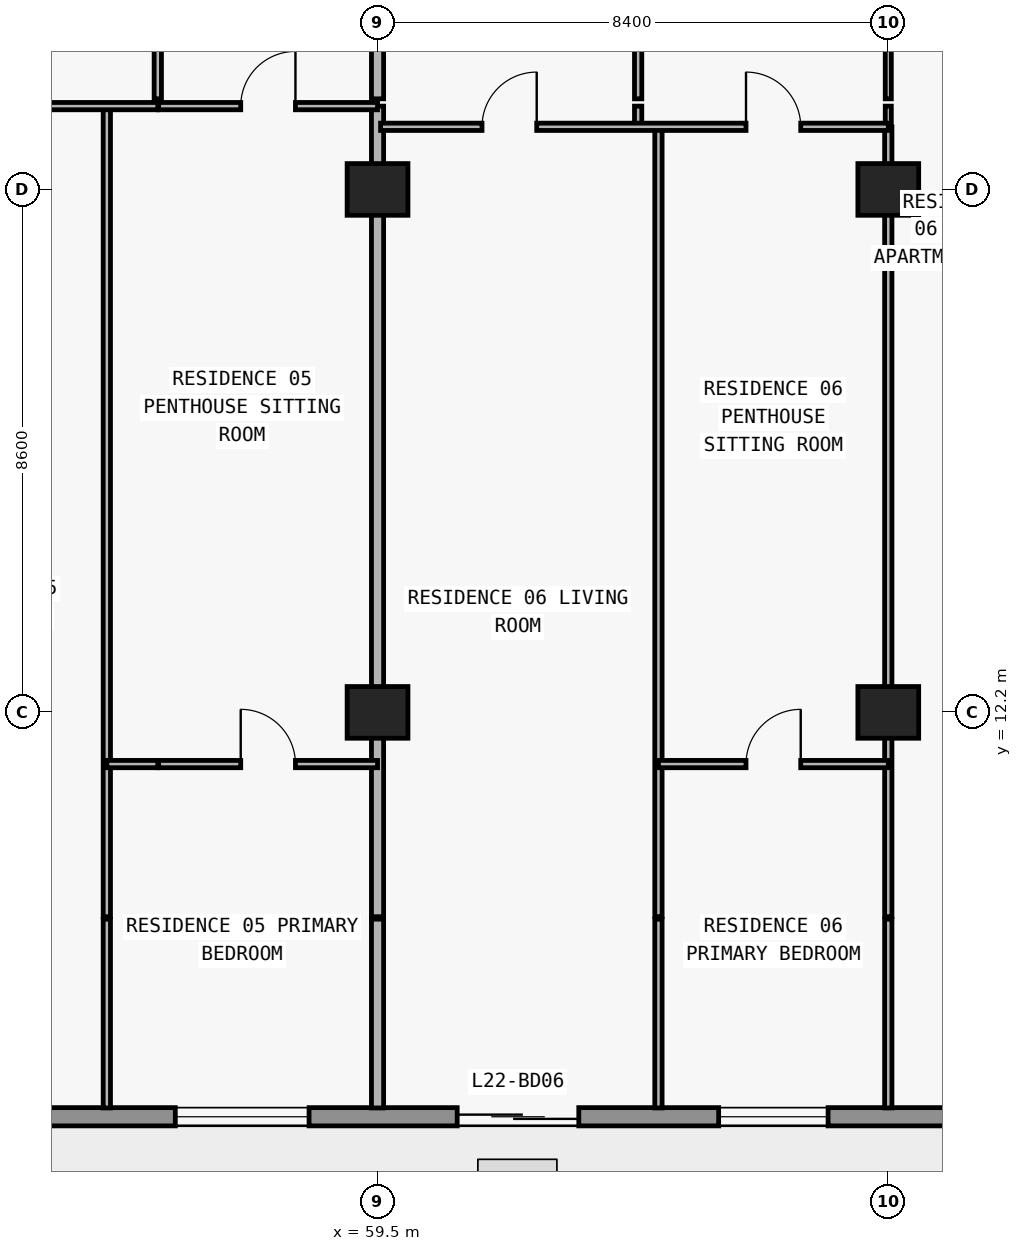
"""IFC4 building model, lengths in metres.
Left out: names, types, materials, properties, quantities, classifications, styles, units other than length and angle.
Written with IfcOpenShell. Run it as: python <this file> out.ifc"""

import sys

from ifc_helpers import new_model, si_unit, direction, frame, frame_2d, origin, origin_2d, place, context, subcontext, project, spatial, rectangle, extrude, element, fill, save


model = new_model("IFC4")
c1 = context("Model", 3, precision=1e-05, world=origin(), true_north=direction((0.0, 1.0)))
c2 = subcontext(c1, "Body", "Model", "MODEL_VIEW")
j1 = project(units=[si_unit("LENGTHUNIT", "METRE"), si_unit("PLANEANGLEUNIT", "RADIAN")], contexts=[c1])
p1 = place(None, origin())
s1 = spatial("IfcSite", under=j1, at=p1, CompositionType="ELEMENT")
p2 = place(p1, origin())
s2 = spatial("IfcBuilding", under=s1, at=p2, CompositionType="ELEMENT")
p3 = place(p2, frame((0.0, 0.0, 84.6)))
s3 = spatial("IfcBuildingStorey", under=s2, at=p3, CompositionType="ELEMENT", Elevation=84.6)
for number, where, z_axis, x_axis in (
    (1, (59.5, 12.2, 0.0), (0.0, 0.0, 1.0), (1.0, 0.0, 0.0)),
    (2, (67.9, 12.2, 0.0), (0.0, 0.0, 1.0), (1.0, 0.0, 0.0)),
    (3, (59.5, 20.8, 0.0), (0.0, 0.0, 1.0), (1.0, 0.0, 0.0)),
    (4, (67.9, 20.8, 0.0), (0.0, 0.0, 1.0), (1.0, 0.0, 0.0)),
):
    element("IfcColumn", number, at=place(p3, frame(where, z_axis=z_axis, x_axis=x_axis)), inside=s3, PredefinedType="COLUMN", context=c2, shape_type="SweptSolid", body=[
        extrude(rectangle(XDim=1.0, YDim=0.85, at=origin_2d()), origin(), (0.0, 0.0, 1.0), 3.05),
    ])
p4 = place(p3, frame((70.1, 5.55, 0.0), z_axis=(0.0, 0.0, 1.0), x_axis=(-1.0, 0.0, 0.0)))
e5 = element("IfcWall", 5, at=p4, inside=s3, PredefinedType="STANDARD", context=c2, shape_type="SweptSolid", body=[
    extrude(rectangle(XDim=62.4, YDim=0.3, at=frame_2d((31.2, 0.0))), origin(), (0.0, 0.0, 1.0), 3.05),
])
p5 = place(p4, frame((57.226, 0.0, 0.0)))
e6 = element("IfcOpeningElement", 6, at=p5, cuts=e5, PredefinedType="OPENING", context=c2, shape_type="SweptSolid", body=[
    extrude(rectangle(XDim=2.0, YDim=2.3, at=frame_2d((1.0, 1.15))), frame((0.0, 0.16, 0.0), z_axis=(0.0, -1.0, 0.0), x_axis=(1.0, 0.0, 0.0)), (0.0, 0.0, 1.0), 0.32),
])
p6 = place(p4, frame((52.926, 0.0, 0.85)))
e7 = element("IfcOpeningElement", 7, at=p6, cuts=e5, PredefinedType="OPENING", context=c2, shape_type="SweptSolid", body=[
    extrude(rectangle(XDim=2.2, YDim=1.55, at=frame_2d((1.1, 0.775))), frame((0.0, 0.16, 0.0), z_axis=(0.0, -1.0, 0.0), x_axis=(1.0, 0.0, 0.0)), (0.0, 0.0, 1.0), 0.32),
])
p7 = place(p4, frame((48.49, 0.0, 0.0)))
e8 = element("IfcOpeningElement", 8, at=p7, cuts=e5, PredefinedType="OPENING", context=c2, shape_type="SweptSolid", body=[
    extrude(rectangle(XDim=2.0, YDim=2.3, at=frame_2d((1.0, 1.15))), frame((0.0, 0.16, 0.0), z_axis=(0.0, -1.0, 0.0), x_axis=(1.0, 0.0, 0.0)), (0.0, 0.0, 1.0), 0.32),
])
p8 = place(p4, frame((44.39, 0.0, 0.85)))
e9 = element("IfcOpeningElement", 9, at=p8, cuts=e5, PredefinedType="OPENING", context=c2, shape_type="SweptSolid", body=[
    extrude(rectangle(XDim=1.8, YDim=1.55, at=frame_2d((0.9, 0.775))), frame((0.0, 0.16, 0.0), z_axis=(0.0, -1.0, 0.0), x_axis=(1.0, 0.0, 0.0)), (0.0, 0.0, 1.0), 0.32),
])
p9 = place(p4, frame((40.426, 0.0, 0.0)))
e10 = element("IfcOpeningElement", 10, at=p9, cuts=e5, PredefinedType="OPENING", context=c2, shape_type="SweptSolid", body=[
    extrude(rectangle(XDim=2.0, YDim=2.3, at=frame_2d((1.0, 1.15))), frame((0.0, 0.16, 0.0), z_axis=(0.0, -1.0, 0.0), x_axis=(1.0, 0.0, 0.0)), (0.0, 0.0, 1.0), 0.32),
])
p10 = place(p4, frame((36.126, 0.0, 0.85)))
e11 = element("IfcOpeningElement", 11, at=p10, cuts=e5, PredefinedType="OPENING", context=c2, shape_type="SweptSolid", body=[
    extrude(rectangle(XDim=2.2, YDim=1.55, at=frame_2d((1.1, 0.775))), frame((0.0, 0.16, 0.0), z_axis=(0.0, -1.0, 0.0), x_axis=(1.0, 0.0, 0.0)), (0.0, 0.0, 1.0), 0.32),
])
p11 = place(p4, frame((32.09, 0.0, 0.0)))
e12 = element("IfcOpeningElement", 12, at=p11, cuts=e5, PredefinedType="OPENING", context=c2, shape_type="SweptSolid", body=[
    extrude(rectangle(XDim=2.0, YDim=2.3, at=frame_2d((1.0, 1.15))), frame((0.0, 0.16, 0.0), z_axis=(0.0, -1.0, 0.0), x_axis=(1.0, 0.0, 0.0)), (0.0, 0.0, 1.0), 0.32),
])
p12 = place(p4, frame((28.21, 0.0, 0.65)))
e13 = element("IfcOpeningElement", 13, at=p12, cuts=e5, PredefinedType="OPENING", context=c2, shape_type="SweptSolid", body=[
    extrude(rectangle(XDim=2.6, YDim=1.85, at=frame_2d((1.3, 0.925))), frame((0.0, 0.16, 0.0), z_axis=(0.0, -1.0, 0.0), x_axis=(1.0, 0.0, 0.0)), (0.0, 0.0, 1.0), 0.32),
])
p13 = place(p4, frame((22.1, 0.0, 0.85)))
e14 = element("IfcOpeningElement", 14, at=p13, cuts=e5, PredefinedType="OPENING", context=c2, shape_type="SweptSolid", body=[
    extrude(rectangle(XDim=2.2, YDim=1.55, at=frame_2d((1.1, 0.775))), frame((0.0, 0.16, 0.0), z_axis=(0.0, -1.0, 0.0), x_axis=(1.0, 0.0, 0.0)), (0.0, 0.0, 1.0), 0.32),
])
p14 = place(p4, frame((16.026, 0.0, 0.0)))
e15 = element("IfcOpeningElement", 15, at=p14, cuts=e5, PredefinedType="OPENING", context=c2, shape_type="SweptSolid", body=[
    extrude(rectangle(XDim=2.0, YDim=2.3, at=frame_2d((1.0, 1.15))), frame((0.0, 0.16, 0.0), z_axis=(0.0, -1.0, 0.0), x_axis=(1.0, 0.0, 0.0)), (0.0, 0.0, 1.0), 0.32),
])
p15 = place(p4, frame((11.726, 0.0, 0.85)))
e16 = element("IfcOpeningElement", 16, at=p15, cuts=e5, PredefinedType="OPENING", context=c2, shape_type="SweptSolid", body=[
    extrude(rectangle(XDim=2.2, YDim=1.55, at=frame_2d((1.1, 0.775))), frame((0.0, 0.16, 0.0), z_axis=(0.0, -1.0, 0.0), x_axis=(1.0, 0.0, 0.0)), (0.0, 0.0, 1.0), 0.32),
])
p16 = place(p4, frame((7.29, 0.0, 0.0)))
e17 = element("IfcOpeningElement", 17, at=p16, cuts=e5, PredefinedType="OPENING", context=c2, shape_type="SweptSolid", body=[
    extrude(rectangle(XDim=2.0, YDim=2.3, at=frame_2d((1.0, 1.15))), frame((0.0, 0.16, 0.0), z_axis=(0.0, -1.0, 0.0), x_axis=(1.0, 0.0, 0.0)), (0.0, 0.0, 1.0), 0.32),
])
p17 = place(p4, frame((3.19, 0.0, 0.85)))
e18 = element("IfcOpeningElement", 18, at=p17, cuts=e5, PredefinedType="OPENING", context=c2, shape_type="SweptSolid", body=[
    extrude(rectangle(XDim=1.8, YDim=1.55, at=frame_2d((0.9, 0.775))), frame((0.0, 0.16, 0.0), z_axis=(0.0, -1.0, 0.0), x_axis=(1.0, 0.0, 0.0)), (0.0, 0.0, 1.0), 0.32),
])
p18 = place(p3, frame((55.048, 5.695, 0.0), z_axis=(0.0, 0.0, 1.0), x_axis=(0.0, 1.0, 0.0)))
e19 = element("IfcWall", 19, at=p18, inside=s3, PredefinedType="PARTITIONING", context=c2, shape_type="SweptSolid", body=[
    extrude(rectangle(XDim=3.105, YDim=0.12, at=frame_2d((1.552, 0.0))), origin(), (0.0, 0.0, 1.0), 3.05),
])
p19 = place(p3, frame((55.048, 8.84, 0.0), z_axis=(0.0, 0.0, 1.0), x_axis=(0.0, 1.0, 0.0)))
e20 = element("IfcWall", 20, at=p19, inside=s3, PredefinedType="PARTITIONING", context=c2, shape_type="SweptSolid", body=[
    extrude(rectangle(XDim=13.33, YDim=0.12, at=frame_2d((6.665, 0.0))), origin(), (0.0, 0.0, 1.0), 3.05),
])
p20 = place(p3, frame((55.886, 22.29, 0.0), z_axis=(0.0, 0.0, 1.0), x_axis=(0.0, 1.0, 0.0)))
e21 = element("IfcWall", 21, at=p20, inside=s3, PredefinedType="PARTITIONING", context=c2, shape_type="SweptSolid", body=[
    extrude(rectangle(XDim=4.69, YDim=0.12, at=frame_2d((2.345, 0.0))), origin(), (0.0, 0.0, 1.0), 3.05),
])
p21 = place(p20, frame((1.895, 0.0, 0.0)))
e22 = element("IfcOpeningElement", 22, at=p21, cuts=e21, PredefinedType="OPENING", context=c2, shape_type="SweptSolid", body=[
    extrude(rectangle(XDim=0.9, YDim=2.15, at=frame_2d((0.45, 1.075))), frame((0.0, 0.07, 0.0), z_axis=(0.0, -1.0, 0.0), x_axis=(1.0, 0.0, 0.0)), (0.0, 0.0, 1.0), 0.14),
])
p22 = place(p3, frame((59.5, 5.695, 0.0), z_axis=(0.0, 0.0, 1.0), x_axis=(0.0, 1.0, 0.0)))
e23 = element("IfcWall", 23, at=p22, inside=s3, PredefinedType="PARTITIONING", context=c2, shape_type="SweptSolid", body=[
    extrude(rectangle(XDim=3.105, YDim=0.2, at=frame_2d((1.552, 0.0))), origin(), (0.0, 0.0, 1.0), 3.05),
])
p23 = place(p3, frame((59.5, 8.84, 0.0), z_axis=(0.0, 0.0, 1.0), x_axis=(0.0, 1.0, 0.0)))
e24 = element("IfcWall", 24, at=p23, inside=s3, PredefinedType="PARTITIONING", context=c2, shape_type="SweptSolid", body=[
    extrude(rectangle(XDim=13.33, YDim=0.2, at=frame_2d((6.665, 0.0))), origin(), (0.0, 0.0, 1.0), 2.174),
])
p24 = place(p3, frame((59.5, 22.29, 0.0), z_axis=(0.0, 0.0, 1.0), x_axis=(0.0, 1.0, 0.0)))
e25 = element("IfcWall", 25, at=p24, inside=s3, PredefinedType="PARTITIONING", context=c2, shape_type="SweptSolid", body=[
    extrude(rectangle(XDim=4.69, YDim=0.2, at=frame_2d((2.345, 0.0))), origin(), (0.0, 0.0, 1.0), 2.174),
])
p25 = place(p3, frame((63.786, 21.83, 0.0), z_axis=(0.0, 0.0, 1.0), x_axis=(0.0, 1.0, 0.0)))
e26 = element("IfcWall", 26, at=p25, inside=s3, PredefinedType="PARTITIONING", context=c2, shape_type="SweptSolid", body=[
    extrude(rectangle(XDim=0.34, YDim=0.12, at=frame_2d((0.17, 0.0))), origin(), (0.0, 0.0, 1.0), 3.05),
])
p26 = place(p3, frame((63.786, 22.29, 0.0), z_axis=(0.0, 0.0, 1.0), x_axis=(0.0, 1.0, 0.0)))
e27 = element("IfcWall", 27, at=p26, inside=s3, PredefinedType="PARTITIONING", context=c2, shape_type="SweptSolid", body=[
    extrude(rectangle(XDim=4.69, YDim=0.12, at=frame_2d((2.345, 0.0))), origin(), (0.0, 0.0, 1.0), 3.05),
])
p27 = place(p26, frame((1.895, 0.0, 0.0)))
e28 = element("IfcOpeningElement", 28, at=p27, cuts=e27, PredefinedType="OPENING", context=c2, shape_type="SweptSolid", body=[
    extrude(rectangle(XDim=0.9, YDim=2.15, at=frame_2d((0.45, 1.075))), frame((0.0, 0.07, 0.0), z_axis=(0.0, -1.0, 0.0), x_axis=(1.0, 0.0, 0.0)), (0.0, 0.0, 1.0), 0.14),
])
p28 = place(p3, frame((64.12, 5.695, 0.0), z_axis=(0.0, 0.0, 1.0), x_axis=(0.0, 1.0, 0.0)))
e29 = element("IfcWall", 29, at=p28, inside=s3, PredefinedType="PARTITIONING", context=c2, shape_type="SweptSolid", body=[
    extrude(rectangle(XDim=3.105, YDim=0.12, at=frame_2d((1.552, 0.0))), origin(), (0.0, 0.0, 1.0), 3.05),
])
p29 = place(p3, frame((64.12, 8.84, 0.0), z_axis=(0.0, 0.0, 1.0), x_axis=(0.0, 1.0, 0.0)))
e30 = element("IfcWall", 30, at=p29, inside=s3, PredefinedType="PARTITIONING", context=c2, shape_type="SweptSolid", body=[
    extrude(rectangle(XDim=12.99, YDim=0.12, at=frame_2d((6.495, 0.0))), origin(), (0.0, 0.0, 1.0), 3.05),
])
p30 = place(p3, frame((67.9, 5.695, 0.0), z_axis=(0.0, 0.0, 1.0), x_axis=(0.0, 1.0, 0.0)))
e31 = element("IfcWall", 31, at=p30, inside=s3, PredefinedType="PARTITIONING", context=c2, shape_type="SweptSolid", body=[
    extrude(rectangle(XDim=3.105, YDim=0.12, at=frame_2d((1.552, 0.0))), origin(), (0.0, 0.0, 1.0), 3.05),
])
p31 = place(p3, frame((67.9, 8.84, 0.0), z_axis=(0.0, 0.0, 1.0), x_axis=(0.0, 1.0, 0.0)))
e32 = element("IfcWall", 32, at=p31, inside=s3, PredefinedType="PARTITIONING", context=c2, shape_type="SweptSolid", body=[
    extrude(rectangle(XDim=12.99, YDim=0.12, at=frame_2d((6.495, 0.0))), origin(), (0.0, 0.0, 1.0), 2.174),
])
p32 = place(p3, frame((67.9, 21.835, 0.0), z_axis=(0.0, 0.0, 1.0), x_axis=(0.0, 1.0, 0.0)))
e33 = element("IfcWall", 33, at=p32, inside=s3, PredefinedType="MOVABLE", context=c2, shape_type="SweptSolid", body=[
    extrude(rectangle(XDim=0.335, YDim=0.1, at=frame_2d((0.167, 0.0))), origin(), (0.0, 0.0, 1.0), 2.174),
])
p33 = place(p3, frame((67.9, 22.29, 0.0), z_axis=(0.0, 0.0, 1.0), x_axis=(0.0, 1.0, 0.0)))
e34 = element("IfcWall", 34, at=p33, inside=s3, PredefinedType="MOVABLE", context=c2, shape_type="SweptSolid", body=[
    extrude(rectangle(XDim=4.69, YDim=0.1, at=frame_2d((2.345, 0.0))), origin(), (0.0, 0.0, 1.0), 2.174),
])
p34 = place(p33, frame((1.895, 0.0, 0.0)))
e35 = element("IfcOpeningElement", 35, at=p34, cuts=e34, PredefinedType="OPENING", context=c2, shape_type="SweptSolid", body=[
    extrude(rectangle(XDim=0.9, YDim=2.124, at=frame_2d((0.45, 1.062))), frame((0.0, 0.06, 0.0), z_axis=(0.0, -1.0, 0.0), x_axis=(1.0, 0.0, 0.0)), (0.0, 0.0, 1.0), 0.12),
])
p35 = place(p3, frame((55.048, 11.35, 0.0), z_axis=(0.0, 0.0, 1.0), x_axis=(1.0, 0.0, 0.0)))
e36 = element("IfcWall", 36, at=p35, inside=s3, PredefinedType="PARTITIONING", context=c2, shape_type="SweptSolid", body=[
    extrude(rectangle(XDim=0.838, YDim=0.12, at=frame_2d((0.419, 0.0))), origin(), (0.0, 0.0, 1.0), 3.05),
])
p36 = place(p3, frame((55.9, 11.35, 0.0), z_axis=(0.0, 0.0, 1.0), x_axis=(1.0, 0.0, 0.0)))
e37 = element("IfcWall", 37, at=p36, inside=s3, PredefinedType="PARTITIONING", context=c2, shape_type="SweptSolid", body=[
    extrude(rectangle(XDim=3.6, YDim=0.12, at=frame_2d((1.8, 0.0))), origin(), (0.0, 0.0, 1.0), 3.05),
])
p37 = place(p36, frame((1.35, 0.0, 0.0)))
e38 = element("IfcOpeningElement", 38, at=p37, cuts=e37, PredefinedType="OPENING", context=c2, shape_type="SweptSolid", body=[
    extrude(rectangle(XDim=0.9, YDim=2.15, at=frame_2d((0.45, 1.075))), frame((0.0, 0.07, 0.0), z_axis=(0.0, -1.0, 0.0), x_axis=(1.0, 0.0, 0.0)), (0.0, 0.0, 1.0), 0.14),
])
p38 = place(p3, frame((64.12, 11.35, 0.0), z_axis=(0.0, 0.0, 1.0), x_axis=(1.0, 0.0, 0.0)))
e39 = element("IfcWall", 39, at=p38, inside=s3, PredefinedType="PARTITIONING", context=c2, shape_type="SweptSolid", body=[
    extrude(rectangle(XDim=3.78, YDim=0.12, at=frame_2d((1.89, 0.0))), origin(), (0.0, 0.0, 1.0), 3.05),
])
p39 = place(p38, frame((1.44, 0.0, 0.0)))
e40 = element("IfcOpeningElement", 40, at=p39, cuts=e39, PredefinedType="OPENING", context=c2, shape_type="SweptSolid", body=[
    extrude(rectangle(XDim=0.9, YDim=2.15, at=frame_2d((0.45, 1.075))), frame((0.0, 0.07, 0.0), z_axis=(0.0, -1.0, 0.0), x_axis=(1.0, 0.0, 0.0)), (0.0, 0.0, 1.0), 0.14),
])
p40 = place(p3, frame((59.55, 21.83, 0.0), z_axis=(0.0, 0.0, 1.0), x_axis=(1.0, 0.0, 0.0)))
e41 = element("IfcWall", 41, at=p40, inside=s3, PredefinedType="PARTITIONING", context=c2, shape_type="SweptSolid", body=[
    extrude(rectangle(XDim=8.35, YDim=0.12, at=frame_2d((4.175, 0.0))), origin(), (0.0, 0.0, 1.0), 3.05),
])
p41 = place(p40, frame((1.668, 0.0, 0.0)))
e42 = element("IfcOpeningElement", 42, at=p41, cuts=e41, PredefinedType="OPENING", context=c2, shape_type="SweptSolid", body=[
    extrude(rectangle(XDim=0.9, YDim=2.15, at=frame_2d((0.45, 1.075))), frame((0.0, 0.07, 0.0), z_axis=(0.0, -1.0, 0.0), x_axis=(1.0, 0.0, 0.0)), (0.0, 0.0, 1.0), 0.14),
])
p42 = place(p40, frame((6.01, 0.0, 0.0)))
e43 = element("IfcOpeningElement", 43, at=p42, cuts=e41, PredefinedType="OPENING", context=c2, shape_type="SweptSolid", body=[
    extrude(rectangle(XDim=0.9, YDim=2.15, at=frame_2d((0.45, 1.075))), frame((0.0, 0.07, 0.0), z_axis=(0.0, -1.0, 0.0), x_axis=(1.0, 0.0, 0.0)), (0.0, 0.0, 1.0), 0.14),
])
p43 = place(p3, frame((51.37, 22.17, 0.0), z_axis=(0.0, 0.0, 1.0), x_axis=(1.0, 0.0, 0.0)))
e44 = element("IfcWall", 44, at=p43, inside=s3, PredefinedType="PARTITIONING", context=c2, shape_type="SweptSolid", body=[
    extrude(rectangle(XDim=4.516, YDim=0.12, at=frame_2d((2.258, 0.0))), origin(), (0.0, 0.0, 1.0), 3.05),
])
p44 = place(p43, frame((1.389, 0.0, 0.0)))
e45 = element("IfcOpeningElement", 45, at=p44, cuts=e44, PredefinedType="OPENING", context=c2, shape_type="SweptSolid", body=[
    extrude(rectangle(XDim=0.9, YDim=2.15, at=frame_2d((0.45, 1.075))), frame((0.0, 0.07, 0.0), z_axis=(0.0, -1.0, 0.0), x_axis=(1.0, 0.0, 0.0)), (0.0, 0.0, 1.0), 0.14),
])
p45 = place(p3, frame((55.9, 22.17, 0.0), z_axis=(0.0, 0.0, 1.0), x_axis=(1.0, 0.0, 0.0)))
e46 = element("IfcWall", 46, at=p45, inside=s3, PredefinedType="PARTITIONING", context=c2, shape_type="SweptSolid", body=[
    extrude(rectangle(XDim=3.6, YDim=0.12, at=frame_2d((1.8, 0.0))), origin(), (0.0, 0.0, 1.0), 3.05),
])
p46 = place(p45, frame((1.35, 0.0, 0.0)))
e47 = element("IfcOpeningElement", 47, at=p46, cuts=e46, PredefinedType="OPENING", context=c2, shape_type="SweptSolid", body=[
    extrude(rectangle(XDim=0.9, YDim=2.15, at=frame_2d((0.45, 1.075))), frame((0.0, 0.07, 0.0), z_axis=(0.0, -1.0, 0.0), x_axis=(1.0, 0.0, 0.0)), (0.0, 0.0, 1.0), 0.14),
])
p47 = place(p15, origin())
e48 = element("IfcWindow", 48, at=p47, inside=s3, PartitioningType="SINGLE_PANEL", PredefinedType="WINDOW", context=c2, shape_type="SweptSolid", body=[
    extrude(rectangle(XDim=2.2, YDim=1.55, at=frame_2d((1.1, 0.775))), frame((0.0, 0.03, 0.0), z_axis=(0.0, -1.0, 0.0), x_axis=(1.0, 0.0, 0.0)), (0.0, 0.0, 1.0), 0.06),
])
fill(e16, e48)
p48 = place(p16, origin())
e49 = element("IfcDoor", 49, at=p48, inside=s3, OperationType="DOUBLE_DOOR_SLIDING", PredefinedType="DOOR", context=c2, shape_type="SweptSolid", body=[
    extrude(rectangle(XDim=2.0, YDim=2.3, at=frame_2d((1.0, 1.15))), frame((0.0, 0.025, 0.0), z_axis=(0.0, -1.0, 0.0), x_axis=(1.0, 0.0, 0.0)), (0.0, 0.0, 1.0), 0.05),
])
fill(e17, e49)
p49 = place(p17, origin())
e50 = element("IfcWindow", 50, at=p49, inside=s3, PartitioningType="SINGLE_PANEL", PredefinedType="WINDOW", context=c2, shape_type="SweptSolid", body=[
    extrude(rectangle(XDim=1.8, YDim=1.55, at=frame_2d((0.9, 0.775))), frame((0.0, 0.03, 0.0), z_axis=(0.0, -1.0, 0.0), x_axis=(1.0, 0.0, 0.0)), (0.0, 0.0, 1.0), 0.06),
])
fill(e18, e50)
p50 = place(p46, origin())
e51 = element("IfcDoor", 51, at=p50, inside=s3, OperationType="SINGLE_SWING_RIGHT", PredefinedType="DOOR", context=c2, shape_type="SweptSolid", body=[
    extrude(rectangle(XDim=0.9, YDim=2.15, at=frame_2d((0.45, 1.075))), frame((0.0, 0.025, 0.0), z_axis=(0.0, -1.0, 0.0), x_axis=(1.0, 0.0, 0.0)), (0.0, 0.0, 1.0), 0.05),
])
fill(e47, e51)
p51 = place(p37, origin())
e52 = element("IfcDoor", 52, at=p51, inside=s3, OperationType="SINGLE_SWING_LEFT", PredefinedType="DOOR", context=c2, shape_type="SweptSolid", body=[
    extrude(rectangle(XDim=0.9, YDim=2.15, at=frame_2d((0.45, 1.075))), frame((0.0, 0.025, 0.0), z_axis=(0.0, -1.0, 0.0), x_axis=(1.0, 0.0, 0.0)), (0.0, 0.0, 1.0), 0.05),
])
fill(e38, e52)
p52 = place(p41, origin())
e53 = element("IfcDoor", 53, at=p52, inside=s3, OperationType="SINGLE_SWING_RIGHT", PredefinedType="DOOR", context=c2, shape_type="SweptSolid", body=[
    extrude(rectangle(XDim=0.9, YDim=2.15, at=frame_2d((0.45, 1.075))), frame((0.0, 0.025, 0.0), z_axis=(0.0, -1.0, 0.0), x_axis=(1.0, 0.0, 0.0)), (0.0, 0.0, 1.0), 0.05),
])
fill(e42, e53)
p53 = place(p42, origin())
e54 = element("IfcDoor", 54, at=p53, inside=s3, OperationType="SINGLE_SWING_LEFT", PredefinedType="DOOR", context=c2, shape_type="SweptSolid", body=[
    extrude(rectangle(XDim=0.9, YDim=2.15, at=frame_2d((0.45, 1.075))), frame((0.0, 0.025, 0.0), z_axis=(0.0, -1.0, 0.0), x_axis=(1.0, 0.0, 0.0)), (0.0, 0.0, 1.0), 0.05),
])
fill(e43, e54)
p54 = place(p39, origin())
e55 = element("IfcDoor", 55, at=p54, inside=s3, OperationType="SINGLE_SWING_RIGHT", PredefinedType="DOOR", context=c2, shape_type="SweptSolid", body=[
    extrude(rectangle(XDim=0.9, YDim=2.15, at=frame_2d((0.45, 1.075))), frame((0.0, 0.025, 0.0), z_axis=(0.0, -1.0, 0.0), x_axis=(1.0, 0.0, 0.0)), (0.0, 0.0, 1.0), 0.05),
])
fill(e40, e55)
save(model, sys.argv[1])
